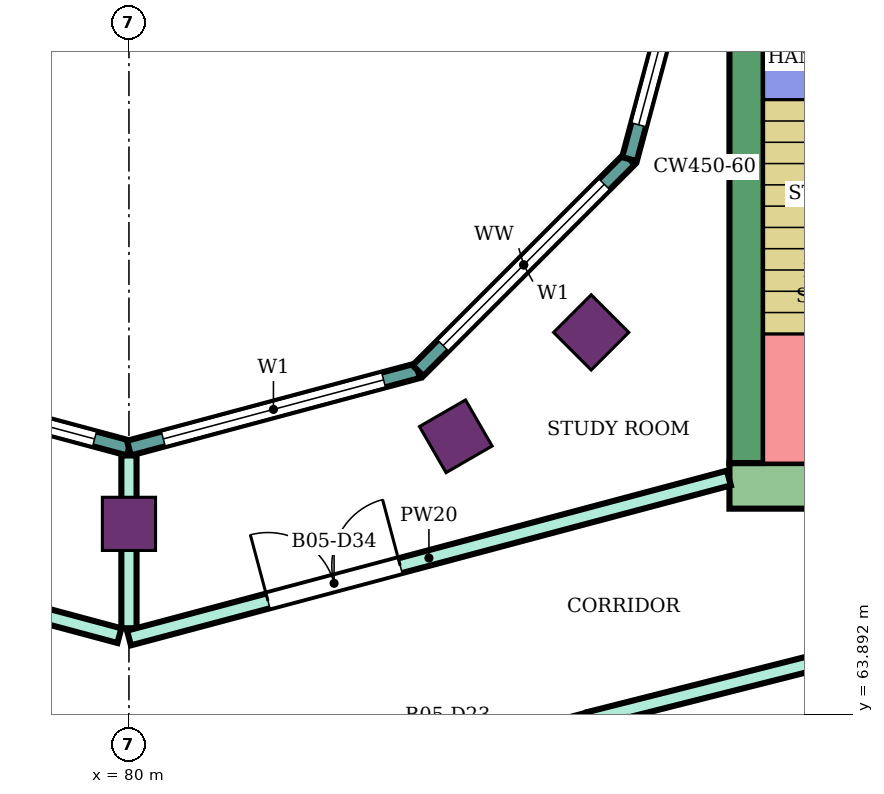
"""IFC4 building model, lengths in metres.
Left out: names, types, materials, properties, quantities, classifications, styles, units other than length and angle.
Written with IfcOpenShell. Run it as: python <this file> out.ifc"""

import sys

from ifc_helpers import new_model, si_unit, direction, frame, frame_2d, origin, origin_2d, place, context, subcontext, project, spatial, rectangle, extrude, element, fill, save


model = new_model("IFC4")
c1 = context("Model", 3, precision=1e-05, world=origin(), true_north=direction((0.0, 1.0)))
c2 = subcontext(c1, "Body", "Model", "MODEL_VIEW")
j1 = project(units=[si_unit("LENGTHUNIT", "METRE"), si_unit("PLANEANGLEUNIT", "RADIAN")], contexts=[c1])
p1 = place(None, origin())
s1 = spatial("IfcSite", under=j1, at=p1, CompositionType="ELEMENT")
p2 = place(p1, origin())
s2 = spatial("IfcBuilding", under=s1, at=p2, CompositionType="ELEMENT")
p3 = place(p2, frame((0.0, 0.0, 262.5)))
s3 = spatial("IfcBuildingStorey", under=s2, at=p3, CompositionType="ELEMENT", Elevation=262.5)
for number, where, z_axis, x_axis in (
    (1, (80.0, 66.4, 0.0), (0.0, 0.0, 1.0), (0.0, -1.0, 0.0)),
    (2, (84.3, 67.552, 0.0), (0.0, 0.0, 1.0), (0.5, -0.866, 0.0)),
    (3, (86.081, 68.919, 0.0), (0.0, 0.0, 1.0), (0.707, -0.707, 0.0)),
):
    element("IfcColumn", number, at=place(p3, frame(where, z_axis=z_axis, x_axis=x_axis)), inside=s3, PredefinedType="COLUMN", context=c2, shape_type="SweptSolid", body=[
        extrude(rectangle(XDim=0.7, YDim=0.7, at=origin_2d()), origin(), (0.0, 0.0, 1.0), 4.2),
    ])
p4 = place(p3, frame((87.9, 66.9, 0.0), z_axis=(0.0, 0.0, 1.0), x_axis=(1.0, 0.0, 0.0)))
e4 = element("IfcWall", 4, at=p4, inside=s3, PredefinedType="SHEAR", context=c2, shape_type="SweptSolid", body=[
    extrude(rectangle(XDim=14.9, YDim=0.6, at=frame_2d((7.45, 0.0))), origin(), (0.0, 0.0, 1.0), 3.88),
])
p5 = place(p4, frame((4.2, 0.0, 0.0)))
e5 = element("IfcOpeningElement", 5, at=p5, cuts=e4, PredefinedType="OPENING", context=c2, shape_type="SweptSolid", body=[
    extrude(rectangle(XDim=2.4, YDim=2.4, at=frame_2d((1.2, 1.2))), frame((0.0, 0.31, 0.0), z_axis=(0.0, -1.0, 0.0), x_axis=(1.0, 0.0, 0.0)), (0.0, 0.0, 1.0), 0.62),
])
p6 = place(p3, frame((88.125, 67.2, 0.0), z_axis=(0.0, 0.0, 1.0), x_axis=(0.0, 1.0, 0.0)))
e6 = element("IfcWall", 6, at=p6, inside=s3, PredefinedType="SHEAR", context=c2, shape_type="SweptSolid", body=[
    extrude(rectangle(XDim=7.8, YDim=0.45, at=frame_2d((3.9, 0.0))), origin(), (0.0, 0.0, 1.0), 3.88),
])
p7 = place(p3, frame((76.198, 68.415, 0.0), z_axis=(0.0, 0.0, 1.0), x_axis=(0.965933654434, -0.258789828301, 0.0)))
e7 = element("IfcWall", 7, at=p7, inside=s3, PredefinedType="NOTDEFINED", context=c2, shape_type="SweptSolid", body=[
    extrude(rectangle(XDim=3.936, YDim=0.2, at=frame_2d((1.968, 0.0))), origin(), (0.0, 0.0, 1.0), 4.2),
])
p8 = place(p7, frame((0.468, 0.0, 0.9)))
e8 = element("IfcOpeningElement", 8, at=p8, cuts=e7, PredefinedType="OPENING", context=c2, shape_type="SweptSolid", body=[
    extrude(rectangle(XDim=3.0, YDim=2.3, at=frame_2d((1.5, 1.15))), frame((0.0, 0.11, 0.0), z_axis=(0.0, -1.0, 0.0), x_axis=(1.0, 0.0, 0.0)), (0.0, 0.0, 1.0), 0.22),
])
p9 = place(p3, frame((80.0, 67.396, 0.0), z_axis=(0.0, 0.0, 1.0), x_axis=(0.965933654434, 0.258789828301, 0.0)))
e9 = element("IfcWall", 9, at=p9, inside=s3, PredefinedType="NOTDEFINED", context=c2, shape_type="SweptSolid", body=[
    extrude(rectangle(XDim=3.936, YDim=0.2, at=frame_2d((1.968, 0.0))), origin(), (0.0, 0.0, 1.0), 4.2),
])
p10 = place(p9, frame((0.468, 0.0, 0.9)))
e10 = element("IfcOpeningElement", 10, at=p10, cuts=e9, PredefinedType="OPENING", context=c2, shape_type="SweptSolid", body=[
    extrude(rectangle(XDim=3.0, YDim=2.3, at=frame_2d((1.5, 1.15))), frame((0.0, 0.11, 0.0), z_axis=(0.0, -1.0, 0.0), x_axis=(1.0, 0.0, 0.0)), (0.0, 0.0, 1.0), 0.22),
])
p11 = place(p3, frame((83.802, 68.415, 0.0), z_axis=(0.0, 0.0, 1.0), x_axis=(0.707106781187, 0.707106781187, 0.0)))
e11 = element("IfcWall", 11, at=p11, inside=s3, PredefinedType="NOTDEFINED", context=c2, shape_type="SweptSolid", body=[
    extrude(rectangle(XDim=3.936, YDim=0.2, at=frame_2d((1.968, 0.0))), origin(), (0.0, 0.0, 1.0), 4.2),
])
p12 = place(p11, frame((0.468, 0.0, 0.9)))
e12 = element("IfcOpeningElement", 12, at=p12, cuts=e11, PredefinedType="OPENING", context=c2, shape_type="SweptSolid", body=[
    extrude(rectangle(XDim=3.0, YDim=2.3, at=frame_2d((1.5, 1.15))), frame((0.0, 0.11, 0.0), z_axis=(0.0, -1.0, 0.0), x_axis=(1.0, 0.0, 0.0)), (0.0, 0.0, 1.0), 0.22),
])
p13 = place(p3, frame((86.585, 71.198, 0.0), z_axis=(0.0, 0.0, 1.0), x_axis=(0.258789828301, 0.965933654434, 0.0)))
e13 = element("IfcWall", 13, at=p13, inside=s3, PredefinedType="NOTDEFINED", context=c2, shape_type="SweptSolid", body=[
    extrude(rectangle(XDim=3.936, YDim=0.2, at=frame_2d((1.968, 0.0))), origin(), (0.0, 0.0, 1.0), 4.2),
])
p14 = place(p13, frame((0.468, 0.0, 0.9)))
e14 = element("IfcOpeningElement", 14, at=p14, cuts=e13, PredefinedType="OPENING", context=c2, shape_type="SweptSolid", body=[
    extrude(rectangle(XDim=3.0, YDim=2.3, at=frame_2d((1.5, 1.15))), frame((0.0, 0.11, 0.0), z_axis=(0.0, -1.0, 0.0), x_axis=(1.0, 0.0, 0.0)), (0.0, 0.0, 1.0), 0.22),
])
p15 = place(p3, frame((73.947, 63.826, 0.0), z_axis=(0.0, 0.0, 1.0), x_axis=(0.965856500469, -0.259077634122, 0.0)))
e15 = element("IfcWall", 15, at=p15, inside=s3, PredefinedType="PARTITIONING", context=c2, shape_type="SweptSolid", body=[
    extrude(rectangle(XDim=6.217, YDim=0.2, at=frame_2d((3.108, 0.0))), origin(), (0.0, 0.0, 1.0), 3.75),
])
p16 = place(p3, frame((74.603, 66.342, 0.0), z_axis=(0.0, 0.0, 1.0), x_axis=(0.965920893652, -0.258837453254, 0.0)))
e16 = element("IfcWall", 16, at=p16, inside=s3, PredefinedType="PARTITIONING", context=c2, shape_type="SweptSolid", body=[
    extrude(rectangle(XDim=5.458, YDim=0.2, at=frame_2d((2.729, 0.0))), origin(), (0.0, 0.0, 1.0), 3.75),
])
p17 = place(p16, frame((2.512, 0.0, 0.0)))
e17 = element("IfcOpeningElement", 17, at=p17, cuts=e16, PredefinedType="OPENING", context=c2, shape_type="SweptSolid", body=[
    extrude(rectangle(XDim=0.9, YDim=2.1, at=frame_2d((0.45, 1.05))), frame((0.0, 0.11, 0.0), z_axis=(0.0, -1.0, 0.0), x_axis=(1.0, 0.0, 0.0)), (0.0, 0.0, 1.0), 0.22),
])
p18 = place(p3, frame((80.048, 62.217, 0.0), z_axis=(0.0, 0.0, 1.0), x_axis=(0.966097920642, 0.258175923996, 0.0)))
e18 = element("IfcWall", 18, at=p18, inside=s3, PredefinedType="PARTITIONING", context=c2, shape_type="SweptSolid", body=[
    extrude(rectangle(XDim=6.217, YDim=0.2, at=frame_2d((3.108, 0.0))), origin(), (0.0, 0.0, 1.0), 3.75),
])
p19 = place(p18, frame((3.792, 0.0, 0.0)))
e19 = element("IfcOpeningElement", 19, at=p19, cuts=e18, PredefinedType="OPENING", context=c2, shape_type="SweptSolid", body=[
    extrude(rectangle(XDim=1.0, YDim=2.1, at=frame_2d((0.5, 1.05))), frame((0.0, 0.11, 0.0), z_axis=(0.0, -1.0, 0.0), x_axis=(1.0, 0.0, 0.0)), (0.0, 0.0, 1.0), 0.22),
])
p20 = place(p3, frame((80.0, 65.027, 0.0), z_axis=(0.0, 0.0, 1.0), x_axis=(0.0, 1.0, 0.0)))
e20 = element("IfcWall", 20, at=p20, inside=s3, PredefinedType="PARTITIONING", context=c2, shape_type="SweptSolid", body=[
    extrude(rectangle(XDim=2.273, YDim=0.2, at=frame_2d((1.136, 0.0))), origin(), (0.0, 0.0, 1.0), 3.75),
])
p21 = place(p3, frame((80.0, 64.898, 0.0), z_axis=(0.0, 0.0, 1.0), x_axis=(0.966236923997, 0.25765520896, 0.0)))
e21 = element("IfcWall", 21, at=p21, inside=s3, PredefinedType="PARTITIONING", context=c2, shape_type="SweptSolid", body=[
    extrude(rectangle(XDim=8.168, YDim=0.2, at=frame_2d((4.084, 0.0))), origin(), (0.0, 0.0, 1.0), 3.75),
])
p22 = place(p21, frame((1.893, 0.0, 0.0)))
e22 = element("IfcOpeningElement", 22, at=p22, cuts=e21, PredefinedType="OPENING", context=c2, shape_type="SweptSolid", body=[
    extrude(rectangle(XDim=1.8, YDim=2.1, at=frame_2d((0.9, 1.05))), frame((0.0, 0.11, 0.0), z_axis=(0.0, -1.0, 0.0), x_axis=(1.0, 0.0, 0.0)), (0.0, 0.0, 1.0), 0.22),
])
p23 = place(p3, frame((86.053, 63.826, 0.0), z_axis=(0.0, 0.0, 1.0), x_axis=(0.969490004987, 0.245130843083, 0.0)))
e23 = element("IfcWall", 23, at=p23, inside=s3, PredefinedType="PARTITIONING", context=c2, shape_type="SweptSolid", body=[
    extrude(rectangle(XDim=5.908, YDim=0.2, at=frame_2d((2.954, 0.0))), origin(), (0.0, 0.0, 1.0), 3.75),
])
p24 = place(p8, origin())
e24 = element("IfcWindow", 24, at=p24, inside=s3, PartitioningType="SINGLE_PANEL", PredefinedType="WINDOW", context=c2, shape_type="SweptSolid", body=[
    extrude(rectangle(XDim=3.0, YDim=2.3, at=frame_2d((1.5, 1.15))), frame((0.0, 0.03, 0.0), z_axis=(0.0, -1.0, 0.0), x_axis=(1.0, 0.0, 0.0)), (0.0, 0.0, 1.0), 0.06),
])
fill(e8, e24)
p25 = place(p10, origin())
e25 = element("IfcWindow", 25, at=p25, inside=s3, PartitioningType="SINGLE_PANEL", PredefinedType="WINDOW", context=c2, shape_type="SweptSolid", body=[
    extrude(rectangle(XDim=3.0, YDim=2.3, at=frame_2d((1.5, 1.15))), frame((0.0, 0.03, 0.0), z_axis=(0.0, -1.0, 0.0), x_axis=(1.0, 0.0, 0.0)), (0.0, 0.0, 1.0), 0.06),
])
fill(e10, e25)
p26 = place(p12, origin())
e26 = element("IfcWindow", 26, at=p26, inside=s3, PartitioningType="SINGLE_PANEL", PredefinedType="WINDOW", context=c2, shape_type="SweptSolid", body=[
    extrude(rectangle(XDim=3.0, YDim=2.3, at=frame_2d((1.5, 1.15))), frame((0.0, 0.03, 0.0), z_axis=(0.0, -1.0, 0.0), x_axis=(1.0, 0.0, 0.0)), (0.0, 0.0, 1.0), 0.06),
])
fill(e12, e26)
p27 = place(p14, origin())
e27 = element("IfcWindow", 27, at=p27, inside=s3, PartitioningType="SINGLE_PANEL", PredefinedType="WINDOW", context=c2, shape_type="SweptSolid", body=[
    extrude(rectangle(XDim=3.0, YDim=2.3, at=frame_2d((1.5, 1.15))), frame((0.0, 0.03, 0.0), z_axis=(0.0, -1.0, 0.0), x_axis=(1.0, 0.0, 0.0)), (0.0, 0.0, 1.0), 0.06),
])
fill(e14, e27)
p28 = place(p22, origin())
e28 = element("IfcDoor", 28, at=p28, inside=s3, OperationType="DOUBLE_DOOR_SINGLE_SWING", PredefinedType="DOOR", context=c2, shape_type="SweptSolid", body=[
    extrude(rectangle(XDim=1.8, YDim=2.1, at=frame_2d((0.9, 1.05))), frame((0.0, 0.025, 0.0), z_axis=(0.0, -1.0, 0.0), x_axis=(1.0, 0.0, 0.0)), (0.0, 0.0, 1.0), 0.05),
])
fill(e22, e28)
save(model, sys.argv[1])
